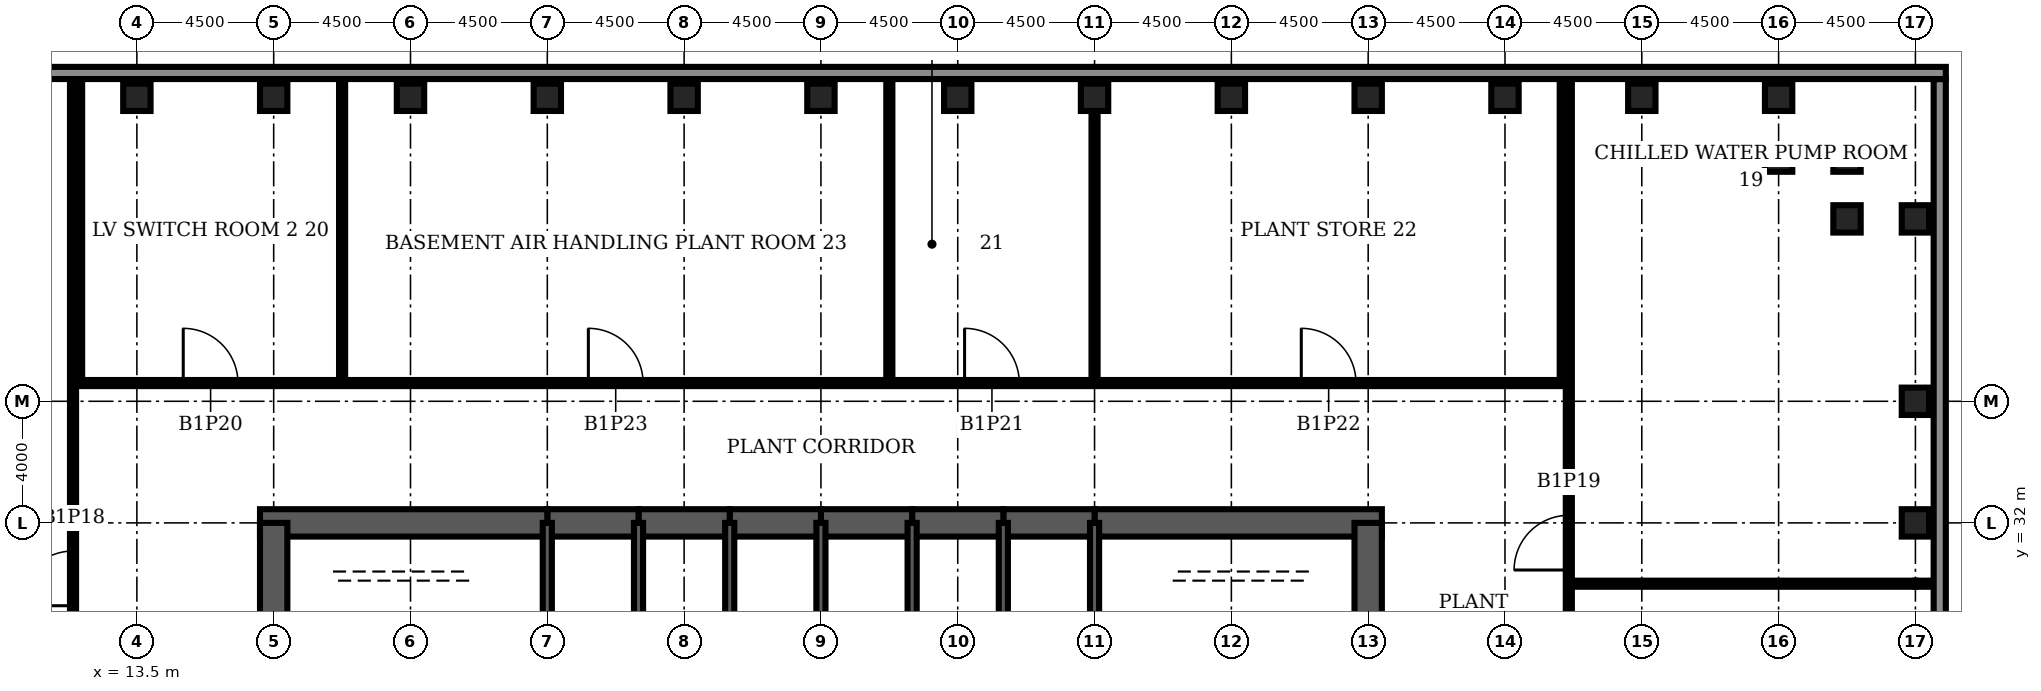
"""IFC4 building model, lengths in metres.
Left out: names, types, materials, properties, quantities, classifications, styles, units other than length and angle.
Written with IfcOpenShell. Run it as: python <this file> out.ifc"""

import sys

from ifc_helpers import new_model, si_unit, direction, frame, frame_2d, origin, origin_2d, place, context, subcontext, project, spatial, rectangle, hollow_rectangle, extrude, element, fill, save


model = new_model("IFC4")
c1 = context("Model", 3, precision=1e-05, world=origin(), true_north=direction((0.0, 1.0)))
c2 = subcontext(c1, "Body", "Model", "MODEL_VIEW")
j1 = project(units=[si_unit("LENGTHUNIT", "METRE"), si_unit("PLANEANGLEUNIT", "RADIAN")], contexts=[c1])
p1 = place(None, origin())
s1 = spatial("IfcSite", under=j1, at=p1, CompositionType="ELEMENT")
p2 = place(p1, origin())
s2 = spatial("IfcBuilding", under=s1, at=p2, CompositionType="ELEMENT")
p3 = place(p2, frame((0.0, 0.0, -6.0)))
s3 = spatial("IfcBuildingStorey", under=s2, at=p3, CompositionType="ELEMENT", Elevation=-6.0)
for number, where, z_axis, x_axis in (
    (1, (72.0, 32.0, 0.0), (0.0, 0.0, 1.0), (1.0, 0.0, 0.0)),
    (2, (72.0, 36.0, 0.0), (0.0, 0.0, 1.0), (1.0, 0.0, 0.0)),
    (3, (72.0, 42.0, 0.0), (0.0, 0.0, 1.0), (1.0, 0.0, 0.0)),
    (4, (69.75, 42.0, 0.0), (0.0, 0.0, 1.0), (1.0, 0.0, 0.0)),
    (5, (69.75, 44.0, 0.0), (0.0, 0.0, 1.0), (1.0, 0.0, 0.0)),
    (6, (67.5, 44.0, 0.0), (0.0, 0.0, 1.0), (0.0, 1.0, 0.0)),
    (7, (67.5, 46.0, 0.0), (0.0, 0.0, 1.0), (0.0, 1.0, 0.0)),
    (8, (63.0, 46.0, 0.0), (0.0, 0.0, 1.0), (0.0, 1.0, 0.0)),
    (9, (58.5, 46.0, 0.0), (0.0, 0.0, 1.0), (0.0, 1.0, 0.0)),
    (10, (54.0, 46.0, 0.0), (0.0, 0.0, 1.0), (0.0, 1.0, 0.0)),
    (11, (49.5, 46.0, 0.0), (0.0, 0.0, 1.0), (0.0, 1.0, 0.0)),
    (12, (45.0, 46.0, 0.0), (0.0, 0.0, 1.0), (0.0, 1.0, 0.0)),
    (13, (40.5, 46.0, 0.0), (0.0, 0.0, 1.0), (0.0, 1.0, 0.0)),
    (14, (36.0, 46.0, 0.0), (0.0, 0.0, 1.0), (0.0, 1.0, 0.0)),
    (15, (31.5, 46.0, 0.0), (0.0, 0.0, 1.0), (0.0, 1.0, 0.0)),
    (16, (27.0, 46.0, 0.0), (0.0, 0.0, 1.0), (0.0, 1.0, 0.0)),
    (17, (22.5, 46.0, 0.0), (0.0, 0.0, 1.0), (0.0, 1.0, 0.0)),
    (18, (18.0, 46.0, 0.0), (0.0, 0.0, 1.0), (0.0, 1.0, 0.0)),
    (19, (13.5, 46.0, 0.0), (0.0, 0.0, 1.0), (0.0, 1.0, 0.0)),
):
    element("IfcColumn", number, at=place(p3, frame(where, z_axis=z_axis, x_axis=x_axis)), inside=s3, PredefinedType="COLUMN", context=c2, shape_type="SweptSolid", body=[
        extrude(hollow_rectangle(XDim=0.9, YDim=0.9, WallThickness=0.12, at=origin_2d()), origin(), (0.0, 0.0, 1.0), 6.0),
    ])
p4 = place(p3, frame((54.45, 32.0, 0.0), z_axis=(0.0, 0.0, 1.0), x_axis=(-1.0, 0.0, 0.0)))
e20 = element("IfcWall", 20, at=p4, inside=s3, PredefinedType="SHEAR", context=c2, shape_type="SweptSolid", body=[
    extrude(rectangle(XDim=9.45, YDim=0.9, at=frame_2d((4.725, 0.0))), origin(), (0.0, 0.0, 1.0), 6.0),
])
for number, where, z_axis, x_axis in (
    (21, (45.0, 32.0, 0.0), (0.0, 0.0, 1.0), (-1.0, 0.0, 0.0)),
    (22, (42.0, 32.0, 0.0), (0.0, 0.0, 1.0), (-1.0, 0.0, 0.0)),
    (23, (39.0, 32.0, 0.0), (0.0, 0.0, 1.0), (-1.0, 0.0, 0.0)),
    (24, (36.0, 32.0, 0.0), (0.0, 0.0, 1.0), (-1.0, 0.0, 0.0)),
    (25, (33.0, 32.0, 0.0), (0.0, 0.0, 1.0), (-1.0, 0.0, 0.0)),
    (26, (30.0, 32.0, 0.0), (0.0, 0.0, 1.0), (-1.0, 0.0, 0.0)),
):
    element("IfcWall", number, at=place(p3, frame(where, z_axis=z_axis, x_axis=x_axis)), inside=s3, PredefinedType="SHEAR", context=c2, shape_type="SweptSolid", body=[
        extrude(rectangle(XDim=3.0, YDim=0.9, at=frame_2d((1.5, 0.0))), origin(), (0.0, 0.0, 1.0), 6.0),
    ])
p5 = place(p3, frame((27.0, 32.0, 0.0), z_axis=(0.0, 0.0, 1.0), x_axis=(-1.0, 0.0, 0.0)))
e27 = element("IfcWall", 27, at=p5, inside=s3, PredefinedType="SHEAR", context=c2, shape_type="SweptSolid", body=[
    extrude(rectangle(XDim=9.45, YDim=0.9, at=frame_2d((4.725, 0.0))), origin(), (0.0, 0.0, 1.0), 6.0),
])
for number, where, z_axis, x_axis in (
    (28, (18.0, 32.0, 0.0), (0.0, 0.0, 1.0), (0.0, -1.0, 0.0)),
    (29, (54.0, 28.8, 0.0), (0.0, 0.0, 1.0), (0.0, 1.0, 0.0)),
):
    element("IfcWall", number, at=place(p3, frame(where, z_axis=z_axis, x_axis=x_axis)), inside=s3, PredefinedType="SHEAR", context=c2, shape_type="SweptSolid", body=[
        extrude(rectangle(XDim=3.2, YDim=0.9, at=frame_2d((1.6, 0.0))), origin(), (0.0, 0.0, 1.0), 6.0),
    ])
for number, where, z_axis, x_axis in (
    (30, (27.0, 28.8, 0.0), (0.0, 0.0, 1.0), (0.0, 1.0, 0.0)),
    (31, (30.0, 28.8, 0.0), (0.0, 0.0, 1.0), (0.0, 1.0, 0.0)),
    (32, (33.0, 28.8, 0.0), (0.0, 0.0, 1.0), (0.0, 1.0, 0.0)),
    (33, (36.0, 28.8, 0.0), (0.0, 0.0, 1.0), (0.0, 1.0, 0.0)),
    (34, (39.0, 28.8, 0.0), (0.0, 0.0, 1.0), (0.0, 1.0, 0.0)),
    (35, (42.0, 28.8, 0.0), (0.0, 0.0, 1.0), (0.0, 1.0, 0.0)),
    (36, (45.0, 28.8, 0.0), (0.0, 0.0, 1.0), (0.0, 1.0, 0.0)),
):
    element("IfcWall", number, at=place(p3, frame(where, z_axis=z_axis, x_axis=x_axis)), inside=s3, PredefinedType="SOLIDWALL", context=c2, shape_type="SweptSolid", body=[
        extrude(rectangle(XDim=3.2, YDim=0.3, at=frame_2d((1.6, 0.0))), origin(), (0.0, 0.0, 1.0), 6.0),
    ])
p6 = place(p3, frame((60.6, 30.0, 0.0), z_axis=(0.0, 0.0, 1.0), x_axis=(1.0, 0.0, 0.0)))
e37 = element("IfcWall", 37, at=p6, inside=s3, PredefinedType="PARTITIONING", context=c2, shape_type="SweptSolid", body=[
    extrude(rectangle(XDim=11.4, YDim=0.2, at=frame_2d((5.7, 0.0))), origin(), (0.0, 0.0, 1.0), 4.692),
])
p7 = place(p3, frame((72.0, 30.0, 0.0), z_axis=(0.0, 0.0, 1.0), x_axis=(1.0, 0.0, 0.0)))
e38 = element("IfcWall", 38, at=p7, inside=s3, PredefinedType="PARTITIONING", context=c2, shape_type="SweptSolid", body=[
    extrude(rectangle(XDim=0.59, YDim=0.2, at=frame_2d((0.295, 0.0))), origin(), (0.0, 0.0, 1.0), 5.7),
])
p8 = place(p3, frame((11.6, 36.6, 0.0), z_axis=(0.0, 0.0, 1.0), x_axis=(1.0, 0.0, 0.0)))
e39 = element("IfcWall", 39, at=p8, inside=s3, PredefinedType="PARTITIONING", context=c2, shape_type="SweptSolid", body=[
    extrude(rectangle(XDim=48.8, YDim=0.2, at=frame_2d((24.4, 0.0))), origin(), (0.0, 0.0, 1.0), 5.7),
])
p9 = place(p8, frame((3.425, 0.0, 0.0)))
e40 = element("IfcOpeningElement", 40, at=p9, cuts=e39, PredefinedType="OPENING", context=c2, shape_type="SweptSolid", body=[
    extrude(rectangle(XDim=1.8, YDim=2.1, at=frame_2d((0.9, 1.05))), frame((0.0, 0.11, 0.0), z_axis=(0.0, -1.0, 0.0), x_axis=(1.0, 0.0, 0.0)), (0.0, 0.0, 1.0), 0.22),
])
p10 = place(p8, frame((29.125, 0.0, 0.0)))
e41 = element("IfcOpeningElement", 41, at=p10, cuts=e39, PredefinedType="OPENING", context=c2, shape_type="SweptSolid", body=[
    extrude(rectangle(XDim=1.8, YDim=2.1, at=frame_2d((0.9, 1.05))), frame((0.0, 0.11, 0.0), z_axis=(0.0, -1.0, 0.0), x_axis=(1.0, 0.0, 0.0)), (0.0, 0.0, 1.0), 0.22),
])
p11 = place(p8, frame((40.2, 0.0, 0.0)))
e42 = element("IfcOpeningElement", 42, at=p11, cuts=e39, PredefinedType="OPENING", context=c2, shape_type="SweptSolid", body=[
    extrude(rectangle(XDim=1.8, YDim=2.1, at=frame_2d((0.9, 1.05))), frame((0.0, 0.11, 0.0), z_axis=(0.0, -1.0, 0.0), x_axis=(1.0, 0.0, 0.0)), (0.0, 0.0, 1.0), 0.22),
])
p12 = place(p8, frame((16.75, 0.0, 0.0)))
e43 = element("IfcOpeningElement", 43, at=p12, cuts=e39, PredefinedType="OPENING", context=c2, shape_type="SweptSolid", body=[
    extrude(rectangle(XDim=1.8, YDim=2.1, at=frame_2d((0.9, 1.05))), frame((0.0, 0.11, 0.0), z_axis=(0.0, -1.0, 0.0), x_axis=(1.0, 0.0, 0.0)), (0.0, 0.0, 1.0), 0.22),
])
p13 = place(p3, frame((11.4, 13.75, 0.0), z_axis=(0.0, 0.0, 1.0), x_axis=(0.0, 1.0, 0.0)))
e44 = element("IfcWall", 44, at=p13, inside=s3, PredefinedType="PARTITIONING", context=c2, shape_type="SweptSolid", body=[
    extrude(rectangle(XDim=32.84, YDim=0.2, at=frame_2d((16.42, 0.0))), origin(), (0.0, 0.0, 1.0), 5.7),
])
p14 = place(p13, frame((15.525, 0.0, 0.0)))
e45 = element("IfcOpeningElement", 45, at=p14, cuts=e44, PredefinedType="OPENING", context=c2, shape_type="SweptSolid", body=[
    extrude(rectangle(XDim=1.8, YDim=2.1, at=frame_2d((0.9, 1.05))), frame((0.0, 0.11, 0.0), z_axis=(0.0, -1.0, 0.0), x_axis=(1.0, 0.0, 0.0)), (0.0, 0.0, 1.0), 0.22),
])
for number, where, z_axis, x_axis in (
    (46, (11.6, 36.6, 0.0), (0.0, 0.0, 1.0), (0.0, 1.0, 0.0)),
    (47, (20.25, 36.6, 0.0), (0.0, 0.0, 1.0), (0.0, 1.0, 0.0)),
    (48, (38.25, 36.6, 0.0), (0.0, 0.0, 1.0), (0.0, 1.0, 0.0)),
    (49, (45.0, 36.6, 0.0), (0.0, 0.0, 1.0), (0.0, 1.0, 0.0)),
    (50, (60.4, 36.6, 0.0), (0.0, 0.0, 1.0), (0.0, 1.0, 0.0)),
):
    element("IfcWall", number, at=place(p3, frame(where, z_axis=z_axis, x_axis=x_axis)), inside=s3, PredefinedType="PARTITIONING", context=c2, shape_type="SweptSolid", body=[
        extrude(rectangle(XDim=9.99, YDim=0.2, at=frame_2d((4.995, 0.0))), origin(), (0.0, 0.0, 1.0), 5.7),
    ])
p15 = place(p3, frame((60.6, 13.75, 0.0), z_axis=(0.0, 0.0, 1.0), x_axis=(0.0, 1.0, 0.0)))
e51 = element("IfcWall", 51, at=p15, inside=s3, PredefinedType="PARTITIONING", context=c2, shape_type="SweptSolid", body=[
    extrude(rectangle(XDim=32.84, YDim=0.2, at=frame_2d((16.42, 0.0))), origin(), (0.0, 0.0, 1.0), 5.7),
])
p16 = place(p15, frame((7.225, 0.0, 0.0)))
e52 = element("IfcOpeningElement", 52, at=p16, cuts=e51, PredefinedType="OPENING", context=c2, shape_type="SweptSolid", body=[
    extrude(rectangle(XDim=1.8, YDim=2.1, at=frame_2d((0.9, 1.05))), frame((0.0, 0.11, 0.0), z_axis=(0.0, -1.0, 0.0), x_axis=(1.0, 0.0, 0.0)), (0.0, 0.0, 1.0), 0.22),
])
p17 = place(p15, frame((16.7, 0.0, 0.0)))
e53 = element("IfcOpeningElement", 53, at=p17, cuts=e51, PredefinedType="OPENING", context=c2, shape_type="SweptSolid", body=[
    extrude(rectangle(XDim=1.8, YDim=2.1, at=frame_2d((0.9, 1.05))), frame((0.0, 0.11, 0.0), z_axis=(0.0, -1.0, 0.0), x_axis=(1.0, 0.0, 0.0)), (0.0, 0.0, 1.0), 0.22),
])
p18 = place(p3, frame((72.8, -21.3, 0.0), z_axis=(0.0, 0.0, 1.0), x_axis=(0.0, 1.0, 0.0)))
e54 = element("IfcWall", 54, at=p18, inside=s3, PredefinedType="SOLIDWALL", context=c2, shape_type="SweptSolid", body=[
    extrude(rectangle(XDim=67.9, YDim=0.4, at=frame_2d((33.95, 0.0))), origin(), (0.0, 0.0, 1.0), 5.7),
])
p19 = place(p3, frame((73.0, 46.8, 0.0), z_axis=(0.0, 0.0, 1.0), x_axis=(-1.0, 0.0, 0.0)))
e55 = element("IfcWall", 55, at=p19, inside=s3, PredefinedType="SOLIDWALL", context=c2, shape_type="SweptSolid", body=[
    extrude(rectangle(XDim=74.0, YDim=0.4, at=frame_2d((37.0, 0.0))), origin(), (0.0, 0.0, 1.0), 5.7),
])
p20 = place(p14, origin())
e56 = element("IfcDoor", 56, at=p20, inside=s3, OperationType="SINGLE_SWING_LEFT", PredefinedType="DOOR", context=c2, shape_type="SweptSolid", body=[
    extrude(rectangle(XDim=1.8, YDim=2.1, at=frame_2d((0.9, 1.05))), frame((0.0, 0.025, 0.0), z_axis=(0.0, -1.0, 0.0), x_axis=(1.0, 0.0, 0.0)), (0.0, 0.0, 1.0), 0.05),
])
fill(e45, e56)
p21 = place(p17, origin())
e57 = element("IfcDoor", 57, at=p21, inside=s3, OperationType="SINGLE_SWING_LEFT", PredefinedType="DOOR", context=c2, shape_type="SweptSolid", body=[
    extrude(rectangle(XDim=1.8, YDim=2.1, at=frame_2d((0.9, 1.05))), frame((0.0, 0.025, 0.0), z_axis=(0.0, -1.0, 0.0), x_axis=(1.0, 0.0, 0.0)), (0.0, 0.0, 1.0), 0.05),
])
fill(e53, e57)
p22 = place(p9, origin())
e58 = element("IfcDoor", 58, at=p22, inside=s3, OperationType="SINGLE_SWING_LEFT", PredefinedType="DOOR", context=c2, shape_type="SweptSolid", body=[
    extrude(rectangle(XDim=1.8, YDim=2.1, at=frame_2d((0.9, 1.05))), frame((0.0, 0.025, 0.0), z_axis=(0.0, -1.0, 0.0), x_axis=(1.0, 0.0, 0.0)), (0.0, 0.0, 1.0), 0.05),
])
fill(e40, e58)
p23 = place(p10, origin())
e59 = element("IfcDoor", 59, at=p23, inside=s3, OperationType="SINGLE_SWING_LEFT", PredefinedType="DOOR", context=c2, shape_type="SweptSolid", body=[
    extrude(rectangle(XDim=1.8, YDim=2.1, at=frame_2d((0.9, 1.05))), frame((0.0, 0.025, 0.0), z_axis=(0.0, -1.0, 0.0), x_axis=(1.0, 0.0, 0.0)), (0.0, 0.0, 1.0), 0.05),
])
fill(e41, e59)
p24 = place(p11, origin())
e60 = element("IfcDoor", 60, at=p24, inside=s3, OperationType="SINGLE_SWING_LEFT", PredefinedType="DOOR", context=c2, shape_type="SweptSolid", body=[
    extrude(rectangle(XDim=1.8, YDim=2.1, at=frame_2d((0.9, 1.05))), frame((0.0, 0.025, 0.0), z_axis=(0.0, -1.0, 0.0), x_axis=(1.0, 0.0, 0.0)), (0.0, 0.0, 1.0), 0.05),
])
fill(e42, e60)
p25 = place(p12, origin())
e61 = element("IfcDoor", 61, at=p25, inside=s3, OperationType="SINGLE_SWING_LEFT", PredefinedType="DOOR", context=c2, shape_type="SweptSolid", body=[
    extrude(rectangle(XDim=1.8, YDim=2.1, at=frame_2d((0.9, 1.05))), frame((0.0, 0.025, 0.0), z_axis=(0.0, -1.0, 0.0), x_axis=(1.0, 0.0, 0.0)), (0.0, 0.0, 1.0), 0.05),
])
fill(e43, e61)
save(model, sys.argv[1])
